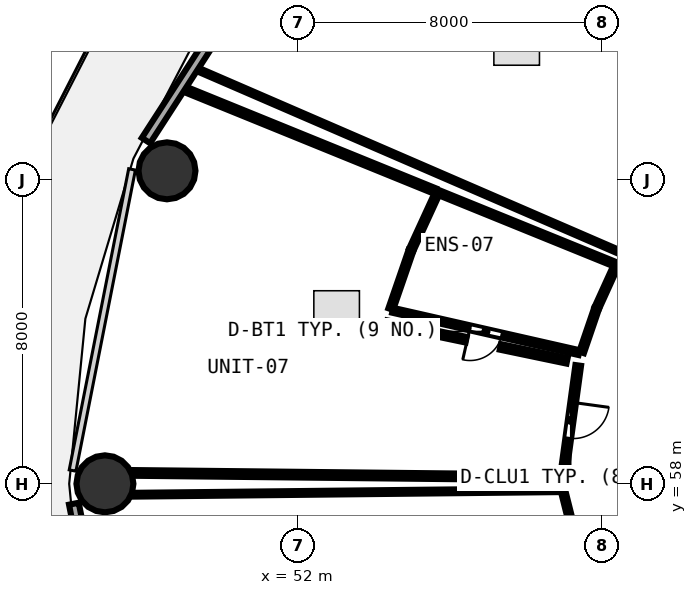
"""IFC4 building model, lengths in metres.
Left out: names, types, materials, properties, quantities, classifications, styles, units other than length and angle.
Written with IfcOpenShell. Run it as: python <this file> out.ifc"""

import sys

from ifc_helpers import new_model, si_unit, direction, frame, frame_2d, origin, origin_2d, place, context, subcontext, project, spatial, rectangle, circle, extrude, element, fill, save


model = new_model("IFC4")
c1 = context("Model", 3, precision=1e-05, world=origin(), true_north=direction((0.0, 1.0)))
c2 = subcontext(c1, "Body", "Model", "MODEL_VIEW")
j1 = project(units=[si_unit("LENGTHUNIT", "METRE"), si_unit("PLANEANGLEUNIT", "RADIAN")], contexts=[c1])
p1 = place(None, origin())
s1 = spatial("IfcSite", under=j1, at=p1, CompositionType="ELEMENT")
p2 = place(p1, origin())
s2 = spatial("IfcBuilding", under=s1, at=p2, CompositionType="ELEMENT")
p3 = place(p2, frame((0.0, 0.0, 22.5)))
s3 = spatial("IfcBuildingStorey", under=s2, at=p3, CompositionType="ELEMENT", Elevation=22.5)
for number, where, z_axis, x_axis in (
    (1, (48.553, 66.236, 0.0), (0.0, 0.0, 1.0), (1.0, 0.0, 0.0)),
    (2, (46.92, 58.0, 0.0), (0.0, 0.0, 1.0), (1.0, 0.0, 0.0)),
):
    element("IfcColumn", number, at=place(p3, frame(where, z_axis=z_axis, x_axis=x_axis)), inside=s3, PredefinedType="COLUMN", context=c2, shape_type="SweptSolid", body=[
        extrude(circle(Radius=0.75, at=origin_2d()), origin(), (0.0, 0.0, 1.0), 3.75),
    ])
p4 = place(p3, frame((52.311, 73.698, 0.0), z_axis=(0.0, 0.0, 1.0), x_axis=(-0.543005114258, -0.839729388488, 0.0)))
e3 = element("IfcWall", 3, at=p4, inside=s3, PredefinedType="SOLIDWALL", context=c2, shape_type="SweptSolid", body=[
    extrude(rectangle(XDim=7.938, YDim=0.26, at=frame_2d((3.969, 0.0))), origin(), (0.0, 0.0, 1.0), 3.475),
])
p5 = place(p4, frame((3.494, 0.0, 0.0)))
e4 = element("IfcOpeningElement", 4, at=p5, cuts=e3, PredefinedType="OPENING", context=c2, shape_type="SweptSolid", body=[
    extrude(rectangle(XDim=0.95, YDim=2.1, at=frame_2d((0.475, 1.05))), frame((0.0, 0.14, 0.0), z_axis=(0.0, -1.0, 0.0), x_axis=(1.0, 0.0, 0.0)), (0.0, 0.0, 1.0), 0.28),
])
p6 = place(p4, frame((1.914, 0.0, 0.85)))
e5 = element("IfcOpeningElement", 5, at=p6, cuts=e3, PredefinedType="OPENING", context=c2, shape_type="SweptSolid", body=[
    extrude(rectangle(XDim=1.2, YDim=1.45, at=frame_2d((0.6, 0.725))), frame((0.0, 0.14, 0.0), z_axis=(0.0, -1.0, 0.0), x_axis=(1.0, 0.0, 0.0)), (0.0, 0.0, 1.0), 0.28),
])
p7 = place(p3, frame((46.104, 57.477, 0.0), z_axis=(0.0, 0.0, 1.0), x_axis=(0.193726159581, -0.98105564322, 0.0)))
e6 = element("IfcWall", 6, at=p7, inside=s3, PredefinedType="SOLIDWALL", context=c2, shape_type="SweptSolid", body=[
    extrude(rectangle(XDim=7.703, YDim=0.26, at=frame_2d((3.851, 0.0))), origin(), (0.0, 0.0, 1.0), 3.475),
])
p8 = place(p7, frame((3.051, 0.0, 0.85)))
e7 = element("IfcOpeningElement", 7, at=p8, cuts=e6, PredefinedType="OPENING", context=c2, shape_type="SweptSolid", body=[
    extrude(rectangle(XDim=1.6, YDim=1.45, at=frame_2d((0.8, 0.725))), frame((0.0, 0.14, 0.0), z_axis=(0.0, -1.0, 0.0), x_axis=(1.0, 0.0, 0.0)), (0.0, 0.0, 1.0), 0.28),
])
p9 = place(p3, frame((59.397, 61.452, 0.0), z_axis=(0.0, 0.0, 1.0), x_axis=(-0.975187669184, 0.221379786503, 0.0)))
e8 = element("IfcWall", 8, at=p9, inside=s3, PredefinedType="PLUMBINGWALL", context=c2, shape_type="SweptSolid", body=[
    extrude(rectangle(XDim=5.029, YDim=0.13, at=frame_2d((2.514, 0.0))), origin(), (0.0, 0.0, 1.0), 3.175),
])
p10 = place(p9, frame((2.084, 0.0, 0.0)))
e9 = element("IfcOpeningElement", 9, at=p10, cuts=e8, PredefinedType="OPENING", context=c2, shape_type="SweptSolid", body=[
    extrude(rectangle(XDim=0.86, YDim=2.05, at=frame_2d((0.43, 1.025))), frame((0.0, 0.075, 0.0), z_axis=(0.0, -1.0, 0.0), x_axis=(1.0, 0.0, 0.0)), (0.0, 0.0, 1.0), 0.15),
])
p11 = place(p3, frame((59.375, 61.115, 0.0), z_axis=(0.0, 0.0, 1.0), x_axis=(-0.135838186105, -0.990731036758, 0.0)))
e10 = element("IfcWall", 10, at=p11, inside=s3, PredefinedType="PARTITIONING", context=c2, shape_type="SweptSolid", body=[
    extrude(rectangle(XDim=2.915, YDim=0.15, at=frame_2d((1.458, 0.0))), origin(), (0.0, 0.0, 1.0), 3.48),
])
p12 = place(p11, frame((0.983, 0.0, 0.0)))
e11 = element("IfcOpeningElement", 11, at=p12, cuts=e10, PredefinedType="OPENING", context=c2, shape_type="SweptSolid", body=[
    extrude(rectangle(XDim=0.95, YDim=2.08, at=frame_2d((0.475, 1.04))), frame((0.0, 0.085, 0.0), z_axis=(0.0, -1.0, 0.0), x_axis=(1.0, 0.0, 0.0)), (0.0, 0.0, 1.0), 0.17),
])
p13 = place(p3, frame((58.986, 57.775, 0.0), z_axis=(0.0, 0.0, 1.0), x_axis=(0.244192294026, -0.969726829338, 0.0)))
e12 = element("IfcWall", 12, at=p13, inside=s3, PredefinedType="PARTITIONING", context=c2, shape_type="SweptSolid", body=[
    extrude(rectangle(XDim=5.651, YDim=0.12, at=frame_2d((2.825, 0.0))), origin(), (0.0, 0.0, 1.0), 3.48),
])
p14 = place(p13, frame((2.375, 0.0, 0.0)))
e13 = element("IfcOpeningElement", 13, at=p14, cuts=e12, PredefinedType="OPENING", context=c2, shape_type="SweptSolid", body=[
    extrude(rectangle(XDim=0.9, YDim=2.08, at=frame_2d((0.45, 1.04))), frame((0.0, 0.07, 0.0), z_axis=(0.0, -1.0, 0.0), x_axis=(1.0, 0.0, 0.0)), (0.0, 0.0, 1.0), 0.14),
])
p15 = place(p3, frame((64.746, 68.789, 0.0), z_axis=(0.0, 0.0, 1.0), x_axis=(-0.66580890104, 0.746122313897, 0.0)))
e14 = element("IfcWall", 14, at=p15, inside=s3, PredefinedType="PARTITIONING", context=c2, shape_type="SweptSolid", body=[
    extrude(rectangle(XDim=11.399, YDim=0.15, at=frame_2d((5.7, 0.0))), origin(), (0.0, 0.0, 1.0), 2.875),
])
p16 = place(p3, frame((60.502, 64.079, 0.0), z_axis=(0.0, 0.0, 1.0), x_axis=(-0.917695041134, 0.397285554077, 0.0)))
e15 = element("IfcWall", 15, at=p16, inside=s3, PredefinedType="PARTITIONING", context=c2, shape_type="SweptSolid", body=[
    extrude(rectangle(XDim=12.07, YDim=0.1, at=frame_2d((6.035, 0.0))), origin(), (0.0, 0.0, 1.0), 2.875),
])
p17 = place(p3, frame((56.632, 76.922, 0.0), z_axis=(0.0, 0.0, 1.0), x_axis=(0.684261294523, -0.729236916796, 0.0)))
e16 = element("IfcWall", 16, at=p17, inside=s3, PredefinedType="PARTITIONING", context=c2, shape_type="SweptSolid", body=[
    extrude(rectangle(XDim=11.438, YDim=0.1, at=frame_2d((5.719, 0.0))), origin(), (0.0, 0.0, 1.0), 2.875),
])
p18 = place(p3, frame((60.372, 63.745, 0.0), z_axis=(0.0, 0.0, 1.0), x_axis=(-0.4138937247, -0.910325208183, 0.0)))
e17 = element("IfcWall", 17, at=p18, inside=s3, PredefinedType="PLUMBINGWALL", context=c2, shape_type="SweptSolid", body=[
    extrude(rectangle(XDim=1.216, YDim=0.13, at=frame_2d((0.608, 0.0))), origin(), (0.0, 0.0, 1.0), 3.48),
])
p19 = place(p3, frame((59.854, 62.601, 0.0), z_axis=(0.0, 0.0, 1.0), x_axis=(-0.323735286305, -0.946147696928, 0.0)))
e18 = element("IfcWall", 18, at=p19, inside=s3, PredefinedType="PLUMBINGWALL", context=c2, shape_type="SweptSolid", body=[
    extrude(rectangle(XDim=1.208, YDim=0.13, at=frame_2d((0.604, 0.0))), origin(), (0.0, 0.0, 1.0), 3.48),
])
p20 = place(p3, frame((54.441, 62.598, 0.0), z_axis=(0.0, 0.0, 1.0), x_axis=(0.326356647952, 0.945246707657, 0.0)))
e19 = element("IfcWall", 19, at=p20, inside=s3, PredefinedType="PLUMBINGWALL", context=c2, shape_type="SweptSolid", body=[
    extrude(rectangle(XDim=1.624, YDim=0.13, at=frame_2d((0.812, 0.0))), origin(), (0.0, 0.0, 1.0), 3.48),
])
p21 = place(p3, frame((54.986, 64.17, 0.0), z_axis=(0.0, 0.0, 1.0), x_axis=(0.41762687648, 0.908618617486, 0.0)))
e20 = element("IfcWall", 20, at=p21, inside=s3, PredefinedType="PLUMBINGWALL", context=c2, shape_type="SweptSolid", body=[
    extrude(rectangle(XDim=1.634, YDim=0.13, at=frame_2d((0.817, 0.0))), origin(), (0.0, 0.0, 1.0), 2.875),
])
p22 = place(p3, frame((55.696, 65.666, 0.0), z_axis=(0.0, 0.0, 1.0), x_axis=(0.926504606816, -0.376283421835, 0.0)))
e21 = element("IfcWall", 21, at=p22, inside=s3, PredefinedType="PLUMBINGWALL", context=c2, shape_type="SweptSolid", body=[
    extrude(rectangle(XDim=5.036, YDim=0.13, at=frame_2d((2.518, 0.0))), origin(), (0.0, 0.0, 1.0), 2.875),
])
p23 = place(p3, frame((58.931, 58.167, 0.0), z_axis=(0.0, 0.0, 1.0), x_axis=(-0.999943877154, 0.010594458135, 0.0)))
e22 = element("IfcWall", 22, at=p23, inside=s3, PredefinedType="PARTITIONING", context=c2, shape_type="SweptSolid", body=[
    extrude(rectangle(XDim=11.292, YDim=0.15, at=frame_2d((5.646, 0.0))), origin(), (0.0, 0.0, 1.0), 2.875),
])
p24 = place(p3, frame((49.135, 68.336, 0.0), z_axis=(0.0, 0.0, 1.0), x_axis=(0.926325178802, -0.376724917038, 0.0)))
e23 = element("IfcWall", 23, at=p24, inside=s3, PredefinedType="PARTITIONING", context=c2, shape_type="SweptSolid", body=[
    extrude(rectangle(XDim=6.983, YDim=0.15, at=frame_2d((3.492, 0.0))), origin(), (0.0, 0.0, 1.0), 2.875),
])
p25 = place(p3, frame((54.337, 62.227, 0.0), z_axis=(0.0, 0.0, 1.0), x_axis=(0.978922282622, -0.204233113343, 0.0)))
e24 = element("IfcWall", 24, at=p25, inside=s3, PredefinedType="PARTITIONING", context=c2, shape_type="SweptSolid", body=[
    extrude(rectangle(XDim=2.133, YDim=0.15, at=frame_2d((1.066, 0.0))), origin(), (0.0, 0.0, 1.0), 3.175),
])
p26 = place(p3, frame((57.325, 61.603, 0.0), z_axis=(0.0, 0.0, 1.0), x_axis=(0.978929424395, -0.204198878681, 0.0)))
e25 = element("IfcWall", 25, at=p26, inside=s3, PredefinedType="PARTITIONING", context=c2, shape_type="SweptSolid", body=[
    extrude(rectangle(XDim=1.793, YDim=0.15, at=frame_2d((0.897, 0.0))), origin(), (0.0, 0.0, 1.0), 3.235),
])
p27 = place(p3, frame((47.64, 57.713, 0.0), z_axis=(0.0, 0.0, 1.0), x_axis=(0.999943877154, 0.010594458135, 0.0)))
e26 = element("IfcWall", 26, at=p27, inside=s3, PredefinedType="PARTITIONING", context=c2, shape_type="SweptSolid", body=[
    extrude(rectangle(XDim=11.292, YDim=0.1, at=frame_2d((5.646, 0.0))), origin(), (0.0, 0.0, 1.0), 2.875),
])
p28 = place(p10, origin())
e27 = element("IfcDoor", 27, at=p28, inside=s3, OperationType="SINGLE_SWING_RIGHT", PredefinedType="DOOR", context=c2, shape_type="SweptSolid", body=[
    extrude(rectangle(XDim=0.86, YDim=2.05, at=frame_2d((0.43, 1.025))), frame((0.0, 0.025, 0.0), z_axis=(0.0, -1.0, 0.0), x_axis=(1.0, 0.0, 0.0)), (0.0, 0.0, 1.0), 0.05),
])
fill(e9, e27)
p29 = place(p12, origin())
e28 = element("IfcDoor", 28, at=p29, inside=s3, OperationType="SINGLE_SWING_LEFT", PredefinedType="DOOR", context=c2, shape_type="SweptSolid", body=[
    extrude(rectangle(XDim=0.95, YDim=2.08, at=frame_2d((0.475, 1.04))), frame((0.0, 0.025, 0.0), z_axis=(0.0, -1.0, 0.0), x_axis=(1.0, 0.0, 0.0)), (0.0, 0.0, 1.0), 0.05),
])
fill(e11, e28)
save(model, sys.argv[1])
